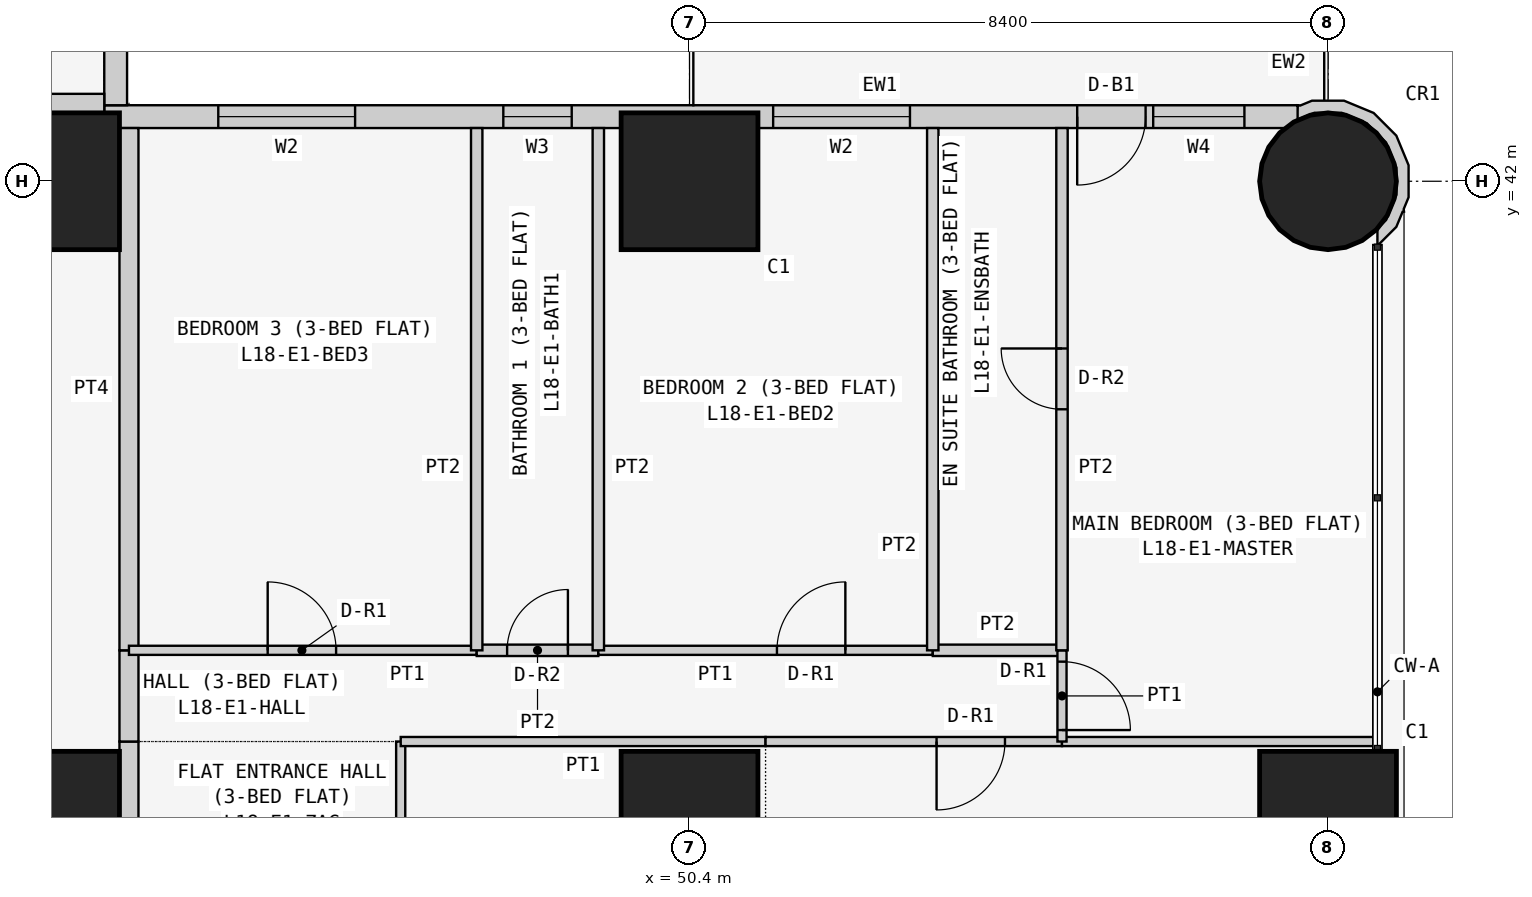
"""IFC4 building model, lengths in metres.
Left out: names, types, materials, properties, quantities, classifications, styles, units other than length and angle.
Written with IfcOpenShell. Run it as: python <this file> out.ifc"""

import sys

from ifc_helpers import new_model, si_unit, direction, frame, frame_2d, origin, origin_2d, place, context, subcontext, project, spatial, polyline, rectangle, circle, outline, extrude, element, fill, save


model = new_model("IFC4")
c1 = context("Model", 3, precision=1e-05, world=origin(), true_north=direction((0.0, 1.0)))
c2 = subcontext(c1, "Body", "Model", "MODEL_VIEW")
j1 = project(units=[si_unit("LENGTHUNIT", "METRE"), si_unit("PLANEANGLEUNIT", "RADIAN")], contexts=[c1])
p1 = place(None, origin())
s1 = spatial("IfcSite", under=j1, at=p1, CompositionType="ELEMENT")
p2 = place(p1, origin())
s2 = spatial("IfcBuilding", under=s1, at=p2, CompositionType="ELEMENT")
p3 = place(p2, frame((0.0, 0.0, 74.1)))
s3 = spatial("IfcBuildingStorey", under=s2, at=p3, CompositionType="ELEMENT", Elevation=74.1)
for number, where, z_axis, x_axis in (
    (1, (42.0, 33.6, 0.0), (0.0, 0.0, 1.0), (1.0, 0.0, 0.0)),
    (2, (42.0, 42.0, 0.0), (0.0, 0.0, 1.0), (1.0, 0.0, 0.0)),
    (3, (50.4, 33.6, 0.0), (0.0, 0.0, 1.0), (1.0, 0.0, 0.0)),
    (4, (50.4, 42.0, 0.0), (0.0, 0.0, 1.0), (1.0, 0.0, 0.0)),
    (5, (58.8, 33.6, 0.0), (0.0, 0.0, 1.0), (1.0, 0.0, 0.0)),
):
    element("IfcColumn", number, at=place(p3, frame(where, z_axis=z_axis, x_axis=x_axis)), inside=s3, PredefinedType="COLUMN", context=c2, shape_type="SweptSolid", body=[
        extrude(rectangle(XDim=1.8, YDim=1.8, at=origin_2d()), origin(), (0.0, 0.0, 1.0), 3.6),
    ])
p4 = place(p3, frame((58.8, 42.0, 0.0), z_axis=(0.0, 0.0, 1.0), x_axis=(1.0, 0.0, 0.0)))
e6 = element("IfcColumn", 6, at=p4, inside=s3, PredefinedType="COLUMN", context=c2, shape_type="SweptSolid", body=[
    extrude(circle(Radius=0.9, at=origin_2d()), origin(), (0.0, 0.0, 1.0), 3.6),
])
p5 = place(p3, frame((58.4, 42.85, 0.0), z_axis=(0.0, 0.0, 1.0), x_axis=(-1.0, 0.0, 0.0)))
e7 = element("IfcWall", 7, at=p5, inside=s3, PredefinedType="SOLIDWALL", context=c2, shape_type="SweptSolid", body=[
    extrude(rectangle(XDim=15.7, YDim=0.3, at=frame_2d((7.85, 0.0))), origin(), (0.0, 0.0, 1.0), 3.45),
])
p6 = place(p5, frame((12.4, 0.0, 0.9)))
e8 = element("IfcOpeningElement", 8, at=p6, cuts=e7, PredefinedType="OPENING", context=c2, shape_type="SweptSolid", body=[
    extrude(rectangle(XDim=1.8, YDim=1.5, at=frame_2d((0.9, 0.75))), frame((0.0, 0.16, 0.0), z_axis=(0.0, -1.0, 0.0), x_axis=(1.0, 0.0, 0.0)), (0.0, 0.0, 1.0), 0.32),
])
p7 = place(p5, frame((9.55, 0.0, 1.5)))
e9 = element("IfcOpeningElement", 9, at=p7, cuts=e7, PredefinedType="OPENING", context=c2, shape_type="SweptSolid", body=[
    extrude(rectangle(XDim=0.9, YDim=0.7, at=frame_2d((0.45, 0.35))), frame((0.0, 0.16, 0.0), z_axis=(0.0, -1.0, 0.0), x_axis=(1.0, 0.0, 0.0)), (0.0, 0.0, 1.0), 0.32),
])
p8 = place(p5, frame((5.1, 0.0, 0.9)))
e10 = element("IfcOpeningElement", 10, at=p8, cuts=e7, PredefinedType="OPENING", context=c2, shape_type="SweptSolid", body=[
    extrude(rectangle(XDim=1.8, YDim=1.5, at=frame_2d((0.9, 0.75))), frame((0.0, 0.16, 0.0), z_axis=(0.0, -1.0, 0.0), x_axis=(1.0, 0.0, 0.0)), (0.0, 0.0, 1.0), 0.32),
])
p9 = place(p5, frame((2.0, 0.0, 0.0)))
e11 = element("IfcOpeningElement", 11, at=p9, cuts=e7, PredefinedType="OPENING", context=c2, shape_type="SweptSolid", body=[
    extrude(rectangle(XDim=0.9, YDim=2.4, at=frame_2d((0.45, 1.2))), frame((0.0, 0.16, 0.0), z_axis=(0.0, -1.0, 0.0), x_axis=(1.0, 0.0, 0.0)), (0.0, 0.0, 1.0), 0.32),
])
p10 = place(p5, frame((0.7, 0.0, 0.9)))
e12 = element("IfcOpeningElement", 12, at=p10, cuts=e7, PredefinedType="OPENING", context=c2, shape_type="SweptSolid", body=[
    extrude(rectangle(XDim=1.2, YDim=1.5, at=frame_2d((0.6, 0.75))), frame((0.0, 0.16, 0.0), z_axis=(0.0, -1.0, 0.0), x_axis=(1.0, 0.0, 0.0)), (0.0, 0.0, 1.0), 0.32),
])
p11 = place(p3, frame((42.85, 43.0, 0.0), z_axis=(0.0, 0.0, 1.0), x_axis=(0.0, 1.0, 0.0)))
e13 = element("IfcWall", 13, at=p11, inside=s3, PredefinedType="SOLIDWALL", context=c2, shape_type="SweptSolid", body=[
    extrude(rectangle(XDim=15.4, YDim=0.3, at=frame_2d((7.7, 0.0))), origin(), (0.0, 0.0, 1.0), 3.45),
])
p12 = place(p11, frame((1.2, 0.0, 0.9)))
e14 = element("IfcOpeningElement", 14, at=p12, cuts=e13, PredefinedType="OPENING", context=c2, shape_type="SweptSolid", body=[
    extrude(rectangle(XDim=1.8, YDim=1.5, at=frame_2d((0.9, 0.75))), frame((0.0, 0.16, 0.0), z_axis=(0.0, -1.0, 0.0), x_axis=(1.0, 0.0, 0.0)), (0.0, 0.0, 1.0), 0.32),
])
p13 = place(p11, frame((4.95, 0.0, 1.5)))
e15 = element("IfcOpeningElement", 15, at=p13, cuts=e13, PredefinedType="OPENING", context=c2, shape_type="SweptSolid", body=[
    extrude(rectangle(XDim=0.9, YDim=0.7, at=frame_2d((0.45, 0.35))), frame((0.0, 0.16, 0.0), z_axis=(0.0, -1.0, 0.0), x_axis=(1.0, 0.0, 0.0)), (0.0, 0.0, 1.0), 0.32),
])
p14 = place(p11, frame((8.5, 0.0, 0.9)))
e16 = element("IfcOpeningElement", 16, at=p14, cuts=e13, PredefinedType="OPENING", context=c2, shape_type="SweptSolid", body=[
    extrude(rectangle(XDim=1.8, YDim=1.5, at=frame_2d((0.9, 0.75))), frame((0.0, 0.16, 0.0), z_axis=(0.0, -1.0, 0.0), x_axis=(1.0, 0.0, 0.0)), (0.0, 0.0, 1.0), 0.32),
])
p15 = place(p11, frame((12.5, 0.0, 0.0)))
e17 = element("IfcOpeningElement", 17, at=p15, cuts=e13, PredefinedType="OPENING", context=c2, shape_type="SweptSolid", body=[
    extrude(rectangle(XDim=0.9, YDim=2.4, at=frame_2d((0.45, 1.2))), frame((0.0, 0.16, 0.0), z_axis=(0.0, -1.0, 0.0), x_axis=(1.0, 0.0, 0.0)), (0.0, 0.0, 1.0), 0.32),
])
p16 = place(p11, frame((13.5, 0.0, 0.9)))
e18 = element("IfcOpeningElement", 18, at=p16, cuts=e13, PredefinedType="OPENING", context=c2, shape_type="SweptSolid", body=[
    extrude(rectangle(XDim=1.2, YDim=1.5, at=frame_2d((0.6, 0.75))), frame((0.0, 0.16, 0.0), z_axis=(0.0, -1.0, 0.0), x_axis=(1.0, 0.0, 0.0)), (0.0, 0.0, 1.0), 0.32),
])
p17 = place(p3, frame((59.411, 41.233, 0.0), z_axis=(0.0, 0.0, 1.0), x_axis=(0.926129809145, 0.377204953059, 0.0)))
e19 = element("IfcWall", 19, at=p17, inside=s3, PredefinedType="SOLIDWALL", context=c2, shape_type="SweptSolid", body=[
    extrude(outline(polyline([(0.626, 0.345), (0.785, 0.736), (0.782, 1.157), (0.619, 1.546), (0.319, 1.843), (-0.072, 2.002), (-0.24, 2.001), (-0.27, 2.017), (-0.37, 1.841), (-0.102, 1.842), (0.23, 1.707), (0.485, 1.455), (0.624, 1.125), (0.626, 0.766), (0.491, 0.434), (0.238, 0.179), (0.09, 0.117), (0.011, -0.078), (0.024, -0.083), (0.329, 0.045), (0.48, 0.198), (0.499, 0.193), (0.508, 0.225), (0.626, 0.345)])), origin(), (0.0, 0.0, 1.0), 3.45),
])
p18 = place(p3, frame((35.829, 43.025, 0.0), z_axis=(0.0, 0.0, 1.0), x_axis=(1.0, 0.0, 0.0)))
e20 = element("IfcWall", 20, at=p18, inside=s3, PredefinedType="PARTITIONING", context=c2, shape_type="SweptSolid", body=[
    extrude(rectangle(XDim=6.871, YDim=0.25, at=frame_2d((3.436, 0.0))), origin(), (0.0, 0.0, 1.0), 3.45),
])
p19 = place(p3, frame((43.025, 34.629, 0.0), z_axis=(0.0, 0.0, 1.0), x_axis=(0.0, -1.0, 0.0)))
e21 = element("IfcWall", 21, at=p19, inside=s3, PredefinedType="PARTITIONING", context=c2, shape_type="SweptSolid", body=[
    extrude(rectangle(XDim=5.229, YDim=0.25, at=frame_2d((2.615, 0.0))), origin(), (0.0, 0.0, 1.0), 3.45),
])
p20 = place(p19, frame((2.129, 0.0, 0.0)))
e22 = element("IfcOpeningElement", 22, at=p20, cuts=e21, PredefinedType="OPENING", context=c2, shape_type="SweptSolid", body=[
    extrude(rectangle(XDim=1.0, YDim=2.1, at=frame_2d((0.5, 1.05))), frame((0.0, 0.135, 0.0), z_axis=(0.0, -1.0, 0.0), x_axis=(1.0, 0.0, 0.0)), (0.0, 0.0, 1.0), 0.27),
])
p21 = place(p3, frame((43.025, 35.829, 0.0), z_axis=(0.0, 0.0, 1.0), x_axis=(0.0, -1.0, 0.0)))
e23 = element("IfcWall", 23, at=p21, inside=s3, PredefinedType="PARTITIONING", context=c2, shape_type="SweptSolid", body=[
    extrude(rectangle(XDim=1.2, YDim=0.25, at=frame_2d((0.6, 0.0))), origin(), (0.0, 0.0, 1.0), 3.45),
])
p22 = place(p3, frame((43.025, 42.7, 0.0), z_axis=(0.0, 0.0, 1.0), x_axis=(0.0, -1.0, 0.0)))
e24 = element("IfcWall", 24, at=p22, inside=s3, PredefinedType="PARTITIONING", context=c2, shape_type="SweptSolid", body=[
    extrude(rectangle(XDim=6.871, YDim=0.25, at=frame_2d((3.436, 0.0))), origin(), (0.0, 0.0, 1.0), 3.45),
])
p23 = place(p3, frame((46.6, 29.4, 0.0), z_axis=(0.0, 0.0, 1.0), x_axis=(0.0, 1.0, 0.0)))
e25 = element("IfcWall", 25, at=p23, inside=s3, PredefinedType="PARTITIONING", context=c2, shape_type="SweptSolid", body=[
    extrude(rectangle(XDim=5.229, YDim=0.12, at=frame_2d((2.615, 0.0))), origin(), (0.0, 0.0, 1.0), 3.45),
])
p24 = place(p23, frame((1.05, 0.0, 0.0)))
e26 = element("IfcOpeningElement", 26, at=p24, cuts=e25, PredefinedType="OPENING", context=c2, shape_type="SweptSolid", body=[
    extrude(rectangle(XDim=0.9, YDim=2.1, at=frame_2d((0.45, 1.05))), frame((0.0, 0.07, 0.0), z_axis=(0.0, -1.0, 0.0), x_axis=(1.0, 0.0, 0.0)), (0.0, 0.0, 1.0), 0.14),
])
p25 = place(p3, frame((51.4, 34.629, 0.0), z_axis=(0.0, 0.0, 1.0), x_axis=(-1.0, 0.0, 0.0)))
e27 = element("IfcWall", 27, at=p25, inside=s3, PredefinedType="PARTITIONING", context=c2, shape_type="SweptSolid", body=[
    extrude(rectangle(XDim=4.8, YDim=0.12, at=frame_2d((2.4, 0.0))), origin(), (0.0, 0.0, 1.0), 3.45),
])
p26 = place(p3, frame((55.3, 34.629, 0.0), z_axis=(0.0, 0.0, 1.0), x_axis=(-1.0, 0.0, 0.0)))
e28 = element("IfcWall", 28, at=p26, inside=s3, PredefinedType="PARTITIONING", context=c2, shape_type="SweptSolid", body=[
    extrude(rectangle(XDim=3.9, YDim=0.12, at=frame_2d((1.95, 0.0))), origin(), (0.0, 0.0, 1.0), 3.45),
])
p27 = place(p26, frame((0.75, 0.0, 0.0)))
e29 = element("IfcOpeningElement", 29, at=p27, cuts=e28, PredefinedType="OPENING", context=c2, shape_type="SweptSolid", body=[
    extrude(rectangle(XDim=0.9, YDim=2.1, at=frame_2d((0.45, 1.05))), frame((0.0, 0.07, 0.0), z_axis=(0.0, -1.0, 0.0), x_axis=(1.0, 0.0, 0.0)), (0.0, 0.0, 1.0), 0.14),
])
p28 = place(p3, frame((59.45, 34.629, 0.0), z_axis=(0.0, 0.0, 1.0), x_axis=(-1.0, 0.0, 0.0)))
e30 = element("IfcWall", 30, at=p28, inside=s3, PredefinedType="PARTITIONING", context=c2, shape_type="SweptSolid", body=[
    extrude(rectangle(XDim=4.15, YDim=0.12, at=frame_2d((2.075, 0.0))), origin(), (0.0, 0.0, 1.0), 3.45),
])
p29 = place(p3, frame((47.6, 35.829, 0.0), z_axis=(0.0, 0.0, 1.0), x_axis=(-1.0, 0.0, 0.0)))
e31 = element("IfcWall", 31, at=p29, inside=s3, PredefinedType="PARTITIONING", context=c2, shape_type="SweptSolid", body=[
    extrude(rectangle(XDim=4.575, YDim=0.12, at=frame_2d((2.288, 0.0))), origin(), (0.0, 0.0, 1.0), 3.45),
])
p30 = place(p29, frame((1.85, 0.0, 0.0)))
e32 = element("IfcOpeningElement", 32, at=p30, cuts=e31, PredefinedType="OPENING", context=c2, shape_type="SweptSolid", body=[
    extrude(rectangle(XDim=0.9, YDim=2.1, at=frame_2d((0.45, 1.05))), frame((0.0, 0.07, 0.0), z_axis=(0.0, -1.0, 0.0), x_axis=(1.0, 0.0, 0.0)), (0.0, 0.0, 1.0), 0.14),
])
p31 = place(p3, frame((49.2, 35.829, 0.0), z_axis=(0.0, 0.0, 1.0), x_axis=(-1.0, 0.0, 0.0)))
e33 = element("IfcWall", 33, at=p31, inside=s3, PredefinedType="PARTITIONING", context=c2, shape_type="SweptSolid", body=[
    extrude(rectangle(XDim=1.6, YDim=0.15, at=frame_2d((0.8, 0.0))), origin(), (0.0, 0.0, 1.0), 3.45),
])
p32 = place(p31, frame((0.4, 0.0, 0.0)))
e34 = element("IfcOpeningElement", 34, at=p32, cuts=e33, PredefinedType="OPENING", context=c2, shape_type="SweptSolid", body=[
    extrude(rectangle(XDim=0.8, YDim=2.1, at=frame_2d((0.4, 1.05))), frame((0.0, 0.085, 0.0), z_axis=(0.0, -1.0, 0.0), x_axis=(1.0, 0.0, 0.0)), (0.0, 0.0, 1.0), 0.17),
])
p33 = place(p3, frame((53.6, 35.829, 0.0), z_axis=(0.0, 0.0, 1.0), x_axis=(-1.0, 0.0, 0.0)))
e35 = element("IfcWall", 35, at=p33, inside=s3, PredefinedType="PARTITIONING", context=c2, shape_type="SweptSolid", body=[
    extrude(rectangle(XDim=4.4, YDim=0.12, at=frame_2d((2.2, 0.0))), origin(), (0.0, 0.0, 1.0), 3.45),
])
p34 = place(p33, frame((1.15, 0.0, 0.0)))
e36 = element("IfcOpeningElement", 36, at=p34, cuts=e35, PredefinedType="OPENING", context=c2, shape_type="SweptSolid", body=[
    extrude(rectangle(XDim=0.9, YDim=2.1, at=frame_2d((0.45, 1.05))), frame((0.0, 0.07, 0.0), z_axis=(0.0, -1.0, 0.0), x_axis=(1.0, 0.0, 0.0)), (0.0, 0.0, 1.0), 0.14),
])
p35 = place(p3, frame((55.3, 35.829, 0.0), z_axis=(0.0, 0.0, 1.0), x_axis=(-1.0, 0.0, 0.0)))
e37 = element("IfcWall", 37, at=p35, inside=s3, PredefinedType="PARTITIONING", context=c2, shape_type="SweptSolid", body=[
    extrude(rectangle(XDim=1.7, YDim=0.15, at=frame_2d((0.85, 0.0))), origin(), (0.0, 0.0, 1.0), 3.45),
])
p36 = place(p3, frame((55.3, 34.629, 0.0), z_axis=(0.0, 0.0, 1.0), x_axis=(0.0, 1.0, 0.0)))
e38 = element("IfcWall", 38, at=p36, inside=s3, PredefinedType="PARTITIONING", context=c2, shape_type="SweptSolid", body=[
    extrude(rectangle(XDim=1.2, YDim=0.12, at=frame_2d((0.6, 0.0))), origin(), (0.0, 0.0, 1.0), 3.45),
])
p37 = place(p36, frame((0.151, 0.0, 0.0)))
e39 = element("IfcOpeningElement", 39, at=p37, cuts=e38, PredefinedType="OPENING", context=c2, shape_type="SweptSolid", body=[
    extrude(rectangle(XDim=0.9, YDim=2.1, at=frame_2d((0.45, 1.05))), frame((0.0, 0.07, 0.0), z_axis=(0.0, -1.0, 0.0), x_axis=(1.0, 0.0, 0.0)), (0.0, 0.0, 1.0), 0.14),
])
for number, where, z_axis, x_axis in (
    (40, (47.6, 35.829, 0.0), (0.0, 0.0, 1.0), (0.0, 1.0, 0.0)),
    (41, (49.2, 35.829, 0.0), (0.0, 0.0, 1.0), (0.0, 1.0, 0.0)),
    (42, (53.6, 35.829, 0.0), (0.0, 0.0, 1.0), (0.0, 1.0, 0.0)),
):
    element("IfcWall", number, at=place(p3, frame(where, z_axis=z_axis, x_axis=x_axis)), inside=s3, PredefinedType="PARTITIONING", context=c2, shape_type="SweptSolid", body=[
        extrude(rectangle(XDim=6.871, YDim=0.15, at=frame_2d((3.436, 0.0))), origin(), (0.0, 0.0, 1.0), 3.45),
    ])
p38 = place(p3, frame((55.3, 35.829, 0.0), z_axis=(0.0, 0.0, 1.0), x_axis=(0.0, 1.0, 0.0)))
e43 = element("IfcWall", 43, at=p38, inside=s3, PredefinedType="PARTITIONING", context=c2, shape_type="SweptSolid", body=[
    extrude(rectangle(XDim=6.871, YDim=0.15, at=frame_2d((3.436, 0.0))), origin(), (0.0, 0.0, 1.0), 3.45),
])
p39 = place(p38, frame((3.171, 0.0, 0.0)))
e44 = element("IfcOpeningElement", 44, at=p39, cuts=e43, PredefinedType="OPENING", context=c2, shape_type="SweptSolid", body=[
    extrude(rectangle(XDim=0.8, YDim=2.1, at=frame_2d((0.4, 1.05))), frame((0.0, 0.085, 0.0), z_axis=(0.0, -1.0, 0.0), x_axis=(1.0, 0.0, 0.0)), (0.0, 0.0, 1.0), 0.17),
])
p40 = place(p6, origin())
e45 = element("IfcWindow", 45, at=p40, inside=s3, PartitioningType="SINGLE_PANEL", PredefinedType="WINDOW", context=c2, shape_type="SweptSolid", body=[
    extrude(rectangle(XDim=1.8, YDim=1.5, at=frame_2d((0.9, 0.75))), frame((0.0, 0.03, 0.0), z_axis=(0.0, -1.0, 0.0), x_axis=(1.0, 0.0, 0.0)), (0.0, 0.0, 1.0), 0.06),
])
fill(e8, e45)
p41 = place(p7, origin())
e46 = element("IfcWindow", 46, at=p41, inside=s3, PartitioningType="SINGLE_PANEL", PredefinedType="WINDOW", context=c2, shape_type="SweptSolid", body=[
    extrude(rectangle(XDim=0.9, YDim=0.7, at=frame_2d((0.45, 0.35))), frame((0.0, 0.03, 0.0), z_axis=(0.0, -1.0, 0.0), x_axis=(1.0, 0.0, 0.0)), (0.0, 0.0, 1.0), 0.06),
])
fill(e9, e46)
p42 = place(p8, origin())
e47 = element("IfcWindow", 47, at=p42, inside=s3, PartitioningType="SINGLE_PANEL", PredefinedType="WINDOW", context=c2, shape_type="SweptSolid", body=[
    extrude(rectangle(XDim=1.8, YDim=1.5, at=frame_2d((0.9, 0.75))), frame((0.0, 0.03, 0.0), z_axis=(0.0, -1.0, 0.0), x_axis=(1.0, 0.0, 0.0)), (0.0, 0.0, 1.0), 0.06),
])
fill(e10, e47)
p43 = place(p9, origin())
e48 = element("IfcDoor", 48, at=p43, inside=s3, OperationType="SINGLE_SWING_RIGHT", PredefinedType="DOOR", context=c2, shape_type="SweptSolid", body=[
    extrude(rectangle(XDim=0.9, YDim=2.4, at=frame_2d((0.45, 1.2))), frame((0.0, 0.025, 0.0), z_axis=(0.0, -1.0, 0.0), x_axis=(1.0, 0.0, 0.0)), (0.0, 0.0, 1.0), 0.05),
])
fill(e11, e48)
p44 = place(p10, origin())
e49 = element("IfcWindow", 49, at=p44, inside=s3, PartitioningType="SINGLE_PANEL", PredefinedType="WINDOW", context=c2, shape_type="SweptSolid", body=[
    extrude(rectangle(XDim=1.2, YDim=1.5, at=frame_2d((0.6, 0.75))), frame((0.0, 0.03, 0.0), z_axis=(0.0, -1.0, 0.0), x_axis=(1.0, 0.0, 0.0)), (0.0, 0.0, 1.0), 0.06),
])
fill(e12, e49)
p45 = place(p27, origin())
e50 = element("IfcDoor", 50, at=p45, inside=s3, OperationType="SINGLE_SWING_RIGHT", PredefinedType="DOOR", context=c2, shape_type="SweptSolid", body=[
    extrude(rectangle(XDim=0.9, YDim=2.1, at=frame_2d((0.45, 1.05))), frame((0.0, 0.025, 0.0), z_axis=(0.0, -1.0, 0.0), x_axis=(1.0, 0.0, 0.0)), (0.0, 0.0, 1.0), 0.05),
])
fill(e29, e50)
p46 = place(p30, frame((0.9, 0.0, 0.0), z_axis=(0.0, 0.0, 1.0), x_axis=(-1.0, 0.0, 0.0)))
e51 = element("IfcDoor", 51, at=p46, inside=s3, OperationType="SINGLE_SWING_LEFT", PredefinedType="DOOR", context=c2, shape_type="SweptSolid", body=[
    extrude(rectangle(XDim=0.9, YDim=2.1, at=frame_2d((0.45, 1.05))), frame((0.0, 0.025, 0.0), z_axis=(0.0, -1.0, 0.0), x_axis=(1.0, 0.0, 0.0)), (0.0, 0.0, 1.0), 0.05),
])
fill(e32, e51)
p47 = place(p32, frame((0.8, 0.0, 0.0), z_axis=(0.0, 0.0, 1.0), x_axis=(-1.0, 0.0, 0.0)))
e52 = element("IfcDoor", 52, at=p47, inside=s3, OperationType="SINGLE_SWING_RIGHT", PredefinedType="DOOR", context=c2, shape_type="SweptSolid", body=[
    extrude(rectangle(XDim=0.8, YDim=2.1, at=frame_2d((0.4, 1.05))), frame((0.0, 0.025, 0.0), z_axis=(0.0, -1.0, 0.0), x_axis=(1.0, 0.0, 0.0)), (0.0, 0.0, 1.0), 0.05),
])
fill(e34, e52)
p48 = place(p34, frame((0.9, 0.0, 0.0), z_axis=(0.0, 0.0, 1.0), x_axis=(-1.0, 0.0, 0.0)))
e53 = element("IfcDoor", 53, at=p48, inside=s3, OperationType="SINGLE_SWING_RIGHT", PredefinedType="DOOR", context=c2, shape_type="SweptSolid", body=[
    extrude(rectangle(XDim=0.9, YDim=2.1, at=frame_2d((0.45, 1.05))), frame((0.0, 0.025, 0.0), z_axis=(0.0, -1.0, 0.0), x_axis=(1.0, 0.0, 0.0)), (0.0, 0.0, 1.0), 0.05),
])
fill(e36, e53)
p49 = place(p37, frame((0.9, 0.0, 0.0), z_axis=(0.0, 0.0, 1.0), x_axis=(-1.0, 0.0, 0.0)))
e54 = element("IfcDoor", 54, at=p49, inside=s3, OperationType="SINGLE_SWING_RIGHT", PredefinedType="DOOR", context=c2, shape_type="SweptSolid", body=[
    extrude(rectangle(XDim=0.9, YDim=2.1, at=frame_2d((0.45, 1.05))), frame((0.0, 0.025, 0.0), z_axis=(0.0, -1.0, 0.0), x_axis=(1.0, 0.0, 0.0)), (0.0, 0.0, 1.0), 0.05),
])
fill(e39, e54)
p50 = place(p39, origin())
e55 = element("IfcDoor", 55, at=p50, inside=s3, OperationType="SINGLE_SWING_RIGHT", PredefinedType="DOOR", context=c2, shape_type="SweptSolid", body=[
    extrude(rectangle(XDim=0.8, YDim=2.1, at=frame_2d((0.4, 1.05))), frame((0.0, 0.025, 0.0), z_axis=(0.0, -1.0, 0.0), x_axis=(1.0, 0.0, 0.0)), (0.0, 0.0, 1.0), 0.05),
])
fill(e44, e55)
save(model, sys.argv[1])
